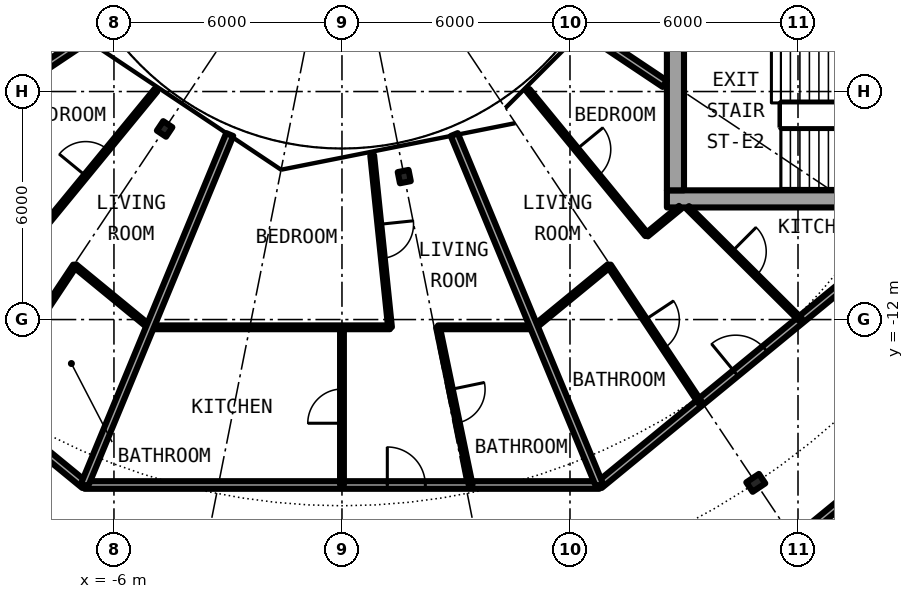
"""IFC4 building model, lengths in metres.
Left out: names, types, materials, properties, quantities, classifications, styles, units other than length and angle.
Written with IfcOpenShell. Run it as: python <this file> out.ifc"""

import sys

from ifc_helpers import new_model, si_unit, direction, frame, frame_2d, origin, origin_2d, place, context, subcontext, project, spatial, rectangle, i_section, extrude, element, fill, save


model = new_model("IFC4")
c1 = context("Model", 3, precision=1e-05, world=origin(), true_north=direction((0.0, 1.0)))
c2 = subcontext(c1, "Body", "Model", "MODEL_VIEW")
j1 = project(units=[si_unit("LENGTHUNIT", "METRE"), si_unit("PLANEANGLEUNIT", "RADIAN")], contexts=[c1])
p1 = place(None, origin())
s1 = spatial("IfcSite", under=j1, at=p1, CompositionType="ELEMENT")
p2 = place(p1, origin())
s2 = spatial("IfcBuilding", under=s1, at=p2, CompositionType="ELEMENT")
p3 = place(p2, frame((0.0, 0.0, 199.35)))
s3 = spatial("IfcBuildingStorey", under=s2, at=p3, CompositionType="ELEMENT", Elevation=199.35)
p4 = place(p3, frame((10.889, -16.297, 0.0), z_axis=(0.0, 0.0, 1.0), x_axis=(0.55557023302, -0.831469612303, 0.0)))
e1 = element("IfcColumn", 1, at=p4, inside=s3, PredefinedType="COLUMN", context=c2, shape_type="SweptSolid", body=[
    extrude(i_section(OverallWidth=0.3, OverallDepth=0.4, WebThickness=0.013, FlangeThickness=0.024, FilletRadius=0.027, at=origin_2d()), origin(), (0.0, 0.0, 1.0), 3.05),
])
for number, where, z_axis, x_axis in (
    (2, (-4.667, -6.984, 0.0), (0.0, 0.0, 1.0), (-0.556, -0.831, 0.0)),
    (3, (1.639, -8.239, 0.0), (0.0, 0.0, 1.0), (0.195, -0.981, 0.0)),
):
    element("IfcColumn", number, at=place(p3, frame(where, z_axis=z_axis, x_axis=x_axis)), inside=s3, PredefinedType="COLUMN", context=c2, shape_type="SweptSolid", body=[
        extrude(i_section(OverallWidth=0.3, OverallDepth=0.29, WebThickness=0.009, FlangeThickness=0.014, FilletRadius=0.027, at=origin_2d()), origin(), (0.0, 0.0, 1.0), 3.05),
    ])
p5 = place(p3, frame((8.55, -8.825, 0.0), z_axis=(0.0, 0.0, 1.0), x_axis=(1.0, 0.0, 0.0)))
e4 = element("IfcWall", 4, at=p5, inside=s3, PredefinedType="SHEAR", context=c2, shape_type="SweptSolid", body=[
    extrude(rectangle(XDim=13.5, YDim=0.45, at=frame_2d((6.75, 0.0))), origin(), (0.0, 0.0, 1.0), 3.05),
])
p6 = place(p5, frame((11.325, 0.0, 0.0)))
e5 = element("IfcOpeningElement", 5, at=p6, cuts=e4, PredefinedType="OPENING", context=c2, shape_type="SweptSolid", body=[
    extrude(rectangle(XDim=1.2, YDim=2.3, at=frame_2d((0.6, 1.15))), frame((0.0, 0.235, 0.0), z_axis=(0.0, -1.0, 0.0), x_axis=(1.0, 0.0, 0.0)), (0.0, 0.0, 1.0), 0.47),
])
p7 = place(p3, frame((8.775, -8.6, 0.0), z_axis=(0.0, 0.0, 1.0), x_axis=(0.0, 1.0, 0.0)))
e6 = element("IfcWall", 6, at=p7, inside=s3, PredefinedType="SHEAR", context=c2, shape_type="SweptSolid", body=[
    extrude(rectangle(XDim=17.2, YDim=0.45, at=frame_2d((8.6, 0.0))), origin(), (0.0, 0.0, 1.0), 3.05),
])
p8 = place(p7, frame((7.4, 0.0, 0.1)))
e7 = element("IfcOpeningElement", 7, at=p8, cuts=e6, PredefinedType="OPENING", context=c2, shape_type="SweptSolid", body=[
    extrude(rectangle(XDim=2.4, YDim=2.2, at=frame_2d((1.2, 1.1))), frame((0.0, 0.235, 0.0), z_axis=(0.0, -1.0, 0.0), x_axis=(1.0, 0.0, 0.0)), (0.0, 0.0, 1.0), 0.47),
])
p9 = place(p3, frame((8.534, -20.603, 0.0), z_axis=(0.0, 0.0, 1.0), x_axis=(0.772983503654, 0.634426121056, 0.0)))
e8 = element("IfcWall", 8, at=p9, inside=s3, PredefinedType="PARTITIONING", context=c2, shape_type="SweptSolid", body=[
    extrude(rectangle(XDim=12.947, YDim=0.2, at=frame_2d((6.474, 0.0))), origin(), (0.0, 0.0, 1.0), 2.7),
])
p10 = place(p9, frame((7.053, 0.0, 0.0)))
e9 = element("IfcOpeningElement", 9, at=p10, cuts=e8, PredefinedType="OPENING", context=c2, shape_type="SweptSolid", body=[
    extrude(rectangle(XDim=1.0, YDim=2.3, at=frame_2d((0.5, 1.15))), frame((0.0, 0.11, 0.0), z_axis=(0.0, -1.0, 0.0), x_axis=(1.0, 0.0, 0.0)), (0.0, 0.0, 1.0), 0.22),
])
p11 = place(p3, frame((-14.717, -9.834, 0.0), z_axis=(0.0, 0.0, 1.0), x_axis=(0.773034536097, -0.634363938131, 0.0)))
e10 = element("IfcWall", 10, at=p11, inside=s3, PredefinedType="PARTITIONING", context=c2, shape_type="SweptSolid", body=[
    extrude(rectangle(XDim=10.277, YDim=0.2, at=frame_2d((5.138, 0.0))), origin(), (0.0, 0.0, 1.0), 2.7),
])
p12 = place(p11, frame((4.638, 0.0, 0.0)))
e11 = element("IfcOpeningElement", 11, at=p12, cuts=e10, PredefinedType="OPENING", context=c2, shape_type="SweptSolid", body=[
    extrude(rectangle(XDim=1.0, YDim=2.3, at=frame_2d((0.5, 1.15))), frame((0.0, 0.11, 0.0), z_axis=(0.0, -1.0, 0.0), x_axis=(1.0, 0.0, 0.0)), (0.0, 0.0, 1.0), 0.22),
])
p13 = place(p3, frame((6.773, -16.353, 0.0), z_axis=(0.0, 0.0, 1.0), x_axis=(0.773034536097, 0.634363938131, 0.0)))
e12 = element("IfcWall", 12, at=p13, inside=s3, PredefinedType="PARTITIONING", context=c2, shape_type="SweptSolid", body=[
    extrude(rectangle(XDim=10.277, YDim=0.2, at=frame_2d((5.138, 0.0))), origin(), (0.0, 0.0, 1.0), 2.7),
])
p14 = place(p13, frame((4.638, 0.0, 0.0)))
e13 = element("IfcOpeningElement", 13, at=p14, cuts=e12, PredefinedType="OPENING", context=c2, shape_type="SweptSolid", body=[
    extrude(rectangle(XDim=1.0, YDim=2.3, at=frame_2d((0.5, 1.15))), frame((0.0, 0.11, 0.0), z_axis=(0.0, -1.0, 0.0), x_axis=(1.0, 0.0, 0.0)), (0.0, 0.0, 1.0), 0.22),
])
p15 = place(p3, frame((-6.773, -16.353, 0.0), z_axis=(0.0, 0.0, 1.0), x_axis=(1.0, 0.0, 0.0)))
e14 = element("IfcWall", 14, at=p15, inside=s3, PredefinedType="PARTITIONING", context=c2, shape_type="SweptSolid", body=[
    extrude(rectangle(XDim=13.546, YDim=0.2, at=frame_2d((6.773, 0.0))), origin(), (0.0, 0.0, 1.0), 2.7),
])
p16 = place(p15, frame((7.966, 0.0, 0.0)))
e15 = element("IfcOpeningElement", 15, at=p16, cuts=e14, PredefinedType="OPENING", context=c2, shape_type="SweptSolid", body=[
    extrude(rectangle(XDim=1.0, YDim=2.3, at=frame_2d((0.5, 1.15))), frame((0.0, 0.11, 0.0), z_axis=(0.0, -1.0, 0.0), x_axis=(1.0, 0.0, 0.0)), (0.0, 0.0, 1.0), 0.22),
])
for number, where, z_axis, x_axis in (
    (16, (-7.031, -10.582, 0.0), (0.0, 0.0, 1.0), (0.773, -0.634, 0.0)),
    (17, (5.055, -12.204, 0.0), (0.0, 0.0, 1.0), (0.773, 0.634, 0.0)),
):
    element("IfcWall", number, at=place(p3, frame(where, z_axis=z_axis, x_axis=x_axis)), inside=s3, PredefinedType="PARTITIONING", context=c2, shape_type="SweptSolid", body=[
        extrude(rectangle(XDim=2.557, YDim=0.1, at=frame_2d((1.278, 0.0))), origin(), (0.0, 0.0, 1.0), 2.7),
    ])
p17 = place(p3, frame((8.017, -9.773, 0.0), z_axis=(0.0, 0.0, 1.0), x_axis=(0.772786083133, 0.634666581534, 0.0)))
e18 = element("IfcWall", 18, at=p17, inside=s3, PredefinedType="PARTITIONING", context=c2, shape_type="SweptSolid", body=[
    extrude(rectangle(XDim=1.144, YDim=0.1, at=frame_2d((0.572, 0.0))), origin(), (0.0, 0.0, 1.0), 2.7),
])
p18 = place(p3, frame((-5.055, -12.204, 0.0), z_axis=(0.0, 0.0, 1.0), x_axis=(1.0, 0.0, 0.0)))
e19 = element("IfcWall", 19, at=p18, inside=s3, PredefinedType="PARTITIONING", context=c2, shape_type="SweptSolid", body=[
    extrude(rectangle(XDim=6.319, YDim=0.1, at=frame_2d((3.159, 0.0))), origin(), (0.0, 0.0, 1.0), 2.7),
])
p19 = place(p3, frame((2.527, -12.204, 0.0), z_axis=(0.0, 0.0, 1.0), x_axis=(1.0, 0.0, 0.0)))
e20 = element("IfcWall", 20, at=p19, inside=s3, PredefinedType="PARTITIONING", context=c2, shape_type="SweptSolid", body=[
    extrude(rectangle(XDim=2.528, YDim=0.1, at=frame_2d((1.264, 0.0))), origin(), (0.0, 0.0, 1.0), 2.7),
])
for number, where, z_axis, x_axis in (
    (21, (-6.513, -4.472, 0.0), (0.0, 0.0, 1.0), (-0.831, -0.556, 0.0)),
    (22, (6.513, -4.472, 0.0), (0.0, 0.0, 1.0), (0.831, -0.556, 0.0)),
):
    element("IfcWall", number, at=place(p3, frame(where, z_axis=z_axis, x_axis=x_axis)), inside=s3, PredefinedType="PARTITIONING", context=c2, shape_type="SweptSolid", body=[
        extrude(rectangle(XDim=2.383, YDim=0.2, at=frame_2d((1.191, 0.0))), origin(), (0.0, 0.0, 1.0), 2.7),
    ])
p20 = place(p3, frame((-9.421, -14.18, 0.0), z_axis=(0.0, 0.0, 1.0), x_axis=(0.553303732327, 0.832979579457, 0.0)))
e23 = element("IfcWall", 23, at=p20, inside=s3, PredefinedType="PARTITIONING", context=c2, shape_type="SweptSolid", body=[
    extrude(rectangle(XDim=4.319, YDim=0.1, at=frame_2d((2.16, 0.0))), origin(), (0.0, 0.0, 1.0), 2.7),
])
p21 = place(p20, frame((1.71, 0.0, 0.0)))
e24 = element("IfcOpeningElement", 24, at=p21, cuts=e23, PredefinedType="OPENING", context=c2, shape_type="SweptSolid", body=[
    extrude(rectangle(XDim=0.9, YDim=2.3, at=frame_2d((0.45, 1.15))), frame((0.0, 0.06, 0.0), z_axis=(0.0, -1.0, 0.0), x_axis=(1.0, 0.0, 0.0)), (0.0, 0.0, 1.0), 0.12),
])
p22 = place(p3, frame((-8.019, -9.771, 0.0), z_axis=(0.0, 0.0, 1.0), x_axis=(0.634401778971, 0.773003481776, 0.0)))
e25 = element("IfcWall", 25, at=p22, inside=s3, PredefinedType="PARTITIONING", context=c2, shape_type="SweptSolid", body=[
    extrude(rectangle(XDim=4.92, YDim=0.1, at=frame_2d((2.46, 0.0))), origin(), (0.0, 0.0, 1.0), 2.7),
])
p23 = place(p22, frame((2.01, 0.0, 0.0)))
e26 = element("IfcOpeningElement", 26, at=p23, cuts=e25, PredefinedType="OPENING", context=c2, shape_type="SweptSolid", body=[
    extrude(rectangle(XDim=0.9, YDim=2.3, at=frame_2d((0.45, 1.15))), frame((0.0, 0.06, 0.0), z_axis=(0.0, -1.0, 0.0), x_axis=(1.0, 0.0, 0.0)), (0.0, 0.0, 1.0), 0.12),
])
p24 = place(p3, frame((-6.774, -16.353, 0.0), z_axis=(0.0, 0.0, 1.0), x_axis=(0.382716169203, 0.92386597179, 0.0)))
e27 = element("IfcWall", 27, at=p24, inside=s3, PredefinedType="PARTITIONING", context=c2, shape_type="SweptSolid", body=[
    extrude(rectangle(XDim=9.981, YDim=0.2, at=frame_2d((4.99, 0.0))), origin(), (0.0, 0.0, 1.0), 2.7),
])
p25 = place(p3, frame((0.0, -16.353, 0.0), z_axis=(0.0, 0.0, 1.0), x_axis=(0.0, 1.0, 0.0)))
e28 = element("IfcWall", 28, at=p25, inside=s3, PredefinedType="PARTITIONING", context=c2, shape_type="SweptSolid", body=[
    extrude(rectangle(XDim=4.149, YDim=0.1, at=frame_2d((2.074, 0.0))), origin(), (0.0, 0.0, 1.0), 2.7),
])
p26 = place(p25, frame((1.625, 0.0, 0.0)))
e29 = element("IfcOpeningElement", 29, at=p26, cuts=e28, PredefinedType="OPENING", context=c2, shape_type="SweptSolid", body=[
    extrude(rectangle(XDim=0.9, YDim=2.3, at=frame_2d((0.45, 1.15))), frame((0.0, 0.06, 0.0), z_axis=(0.0, -1.0, 0.0), x_axis=(1.0, 0.0, 0.0)), (0.0, 0.0, 1.0), 0.12),
])
p27 = place(p3, frame((0.795, -7.679, 0.0), z_axis=(0.0, 0.0, 1.0), x_axis=(0.103089563582, -0.994672077561, 0.0)))
e30 = element("IfcWall", 30, at=p27, inside=s3, PredefinedType="PARTITIONING", context=c2, shape_type="SweptSolid", body=[
    extrude(rectangle(XDim=4.549, YDim=0.1, at=frame_2d((2.275, 0.0))), origin(), (0.0, 0.0, 1.0), 2.7),
])
p28 = place(p27, frame((1.825, 0.0, 0.0)))
e31 = element("IfcOpeningElement", 31, at=p28, cuts=e30, PredefinedType="OPENING", context=c2, shape_type="SweptSolid", body=[
    extrude(rectangle(XDim=0.9, YDim=2.3, at=frame_2d((0.45, 1.15))), frame((0.0, 0.06, 0.0), z_axis=(0.0, -1.0, 0.0), x_axis=(1.0, 0.0, 0.0)), (0.0, 0.0, 1.0), 0.12),
])
p29 = place(p3, frame((2.527, -12.204, 0.0), z_axis=(0.0, 0.0, 1.0), x_axis=(0.202937120105, -0.979191771454, 0.0)))
e32 = element("IfcWall", 32, at=p29, inside=s3, PredefinedType="PARTITIONING", context=c2, shape_type="SweptSolid", body=[
    extrude(rectangle(XDim=4.237, YDim=0.1, at=frame_2d((2.119, 0.0))), origin(), (0.0, 0.0, 1.0), 2.7),
])
p30 = place(p29, frame((1.669, 0.0, 0.0)))
e33 = element("IfcOpeningElement", 33, at=p30, cuts=e32, PredefinedType="OPENING", context=c2, shape_type="SweptSolid", body=[
    extrude(rectangle(XDim=0.9, YDim=2.3, at=frame_2d((0.45, 1.15))), frame((0.0, 0.06, 0.0), z_axis=(0.0, -1.0, 0.0), x_axis=(1.0, 0.0, 0.0)), (0.0, 0.0, 1.0), 0.12),
])
p31 = place(p3, frame((2.954, -7.132, 0.0), z_axis=(0.0, 0.0, 1.0), x_axis=(0.382716169203, -0.92386597179, 0.0)))
e34 = element("IfcWall", 34, at=p31, inside=s3, PredefinedType="PARTITIONING", context=c2, shape_type="SweptSolid", body=[
    extrude(rectangle(XDim=9.981, YDim=0.2, at=frame_2d((4.99, 0.0))), origin(), (0.0, 0.0, 1.0), 2.7),
])
p32 = place(p3, frame((4.898, -5.968, 0.0), z_axis=(0.0, 0.0, 1.0), x_axis=(0.634401778971, -0.773003481776, 0.0)))
e35 = element("IfcWall", 35, at=p32, inside=s3, PredefinedType="PARTITIONING", context=c2, shape_type="SweptSolid", body=[
    extrude(rectangle(XDim=4.92, YDim=0.1, at=frame_2d((2.46, 0.0))), origin(), (0.0, 0.0, 1.0), 2.7),
])
p33 = place(p32, frame((2.01, 0.0, 0.0)))
e36 = element("IfcOpeningElement", 36, at=p33, cuts=e35, PredefinedType="OPENING", context=c2, shape_type="SweptSolid", body=[
    extrude(rectangle(XDim=0.9, YDim=2.3, at=frame_2d((0.45, 1.15))), frame((0.0, 0.06, 0.0), z_axis=(0.0, -1.0, 0.0), x_axis=(1.0, 0.0, 0.0)), (0.0, 0.0, 1.0), 0.12),
])
p34 = place(p3, frame((7.031, -10.582, 0.0), z_axis=(0.0, 0.0, 1.0), x_axis=(0.553303732327, -0.832979579457, 0.0)))
e37 = element("IfcWall", 37, at=p34, inside=s3, PredefinedType="PARTITIONING", context=c2, shape_type="SweptSolid", body=[
    extrude(rectangle(XDim=4.319, YDim=0.1, at=frame_2d((2.16, 0.0))), origin(), (0.0, 0.0, 1.0), 2.7),
])
p35 = place(p34, frame((1.71, 0.0, 0.0)))
e38 = element("IfcOpeningElement", 38, at=p35, cuts=e37, PredefinedType="OPENING", context=c2, shape_type="SweptSolid", body=[
    extrude(rectangle(XDim=0.9, YDim=2.3, at=frame_2d((0.45, 1.15))), frame((0.0, 0.06, 0.0), z_axis=(0.0, -1.0, 0.0), x_axis=(1.0, 0.0, 0.0)), (0.0, 0.0, 1.0), 0.12),
])
p36 = place(p3, frame((9.097, -9.05, 0.0), z_axis=(0.0, 0.0, 1.0), x_axis=(0.708909651863, -0.705299302067, 0.0)))
e39 = element("IfcWall", 39, at=p36, inside=s3, PredefinedType="PARTITIONING", context=c2, shape_type="SweptSolid", body=[
    extrude(rectangle(XDim=4.193, YDim=0.1, at=frame_2d((2.096, 0.0))), origin(), (0.0, 0.0, 1.0), 2.7),
])
p37 = place(p36, frame((1.646, 0.0, 0.0)))
e40 = element("IfcOpeningElement", 40, at=p37, cuts=e39, PredefinedType="OPENING", context=c2, shape_type="SweptSolid", body=[
    extrude(rectangle(XDim=0.9, YDim=2.3, at=frame_2d((0.45, 1.15))), frame((0.0, 0.06, 0.0), z_axis=(0.0, -1.0, 0.0), x_axis=(1.0, 0.0, 0.0)), (0.0, 0.0, 1.0), 0.12),
])
p38 = place(p23, origin())
e41 = element("IfcDoor", 41, at=p38, inside=s3, OperationType="SINGLE_SWING_LEFT", PredefinedType="DOOR", context=c2, shape_type="SweptSolid", body=[
    extrude(rectangle(XDim=0.9, YDim=2.3, at=frame_2d((0.45, 1.15))), frame((0.0, 0.025, 0.0), z_axis=(0.0, -1.0, 0.0), x_axis=(1.0, 0.0, 0.0)), (0.0, 0.0, 1.0), 0.05),
])
fill(e26, e41)
p39 = place(p16, origin())
e42 = element("IfcDoor", 42, at=p39, inside=s3, OperationType="SINGLE_SWING_RIGHT", PredefinedType="DOOR", context=c2, shape_type="SweptSolid", body=[
    extrude(rectangle(XDim=1.0, YDim=2.3, at=frame_2d((0.5, 1.15))), frame((0.0, 0.025, 0.0), z_axis=(0.0, -1.0, 0.0), x_axis=(1.0, 0.0, 0.0)), (0.0, 0.0, 1.0), 0.05),
])
fill(e15, e42)
p40 = place(p30, origin())
e43 = element("IfcDoor", 43, at=p40, inside=s3, OperationType="SINGLE_SWING_RIGHT", PredefinedType="DOOR", context=c2, shape_type="SweptSolid", body=[
    extrude(rectangle(XDim=0.9, YDim=2.3, at=frame_2d((0.45, 1.15))), frame((0.0, 0.025, 0.0), z_axis=(0.0, -1.0, 0.0), x_axis=(1.0, 0.0, 0.0)), (0.0, 0.0, 1.0), 0.05),
])
fill(e33, e43)
p41 = place(p26, origin())
e44 = element("IfcDoor", 44, at=p41, inside=s3, OperationType="SINGLE_SWING_RIGHT", PredefinedType="DOOR", context=c2, shape_type="SweptSolid", body=[
    extrude(rectangle(XDim=0.9, YDim=2.3, at=frame_2d((0.45, 1.15))), frame((0.0, 0.025, 0.0), z_axis=(0.0, -1.0, 0.0), x_axis=(1.0, 0.0, 0.0)), (0.0, 0.0, 1.0), 0.05),
])
fill(e29, e44)
p42 = place(p28, origin())
e45 = element("IfcDoor", 45, at=p42, inside=s3, OperationType="SINGLE_SWING_RIGHT", PredefinedType="DOOR", context=c2, shape_type="SweptSolid", body=[
    extrude(rectangle(XDim=0.9, YDim=2.3, at=frame_2d((0.45, 1.15))), frame((0.0, 0.025, 0.0), z_axis=(0.0, -1.0, 0.0), x_axis=(1.0, 0.0, 0.0)), (0.0, 0.0, 1.0), 0.05),
])
fill(e31, e45)
p43 = place(p14, origin())
e46 = element("IfcDoor", 46, at=p43, inside=s3, OperationType="SINGLE_SWING_RIGHT", PredefinedType="DOOR", context=c2, shape_type="SweptSolid", body=[
    extrude(rectangle(XDim=1.0, YDim=2.3, at=frame_2d((0.5, 1.15))), frame((0.0, 0.025, 0.0), z_axis=(0.0, -1.0, 0.0), x_axis=(1.0, 0.0, 0.0)), (0.0, 0.0, 1.0), 0.05),
])
fill(e13, e46)
p44 = place(p35, origin())
e47 = element("IfcDoor", 47, at=p44, inside=s3, OperationType="SINGLE_SWING_RIGHT", PredefinedType="DOOR", context=c2, shape_type="SweptSolid", body=[
    extrude(rectangle(XDim=0.9, YDim=2.3, at=frame_2d((0.45, 1.15))), frame((0.0, 0.025, 0.0), z_axis=(0.0, -1.0, 0.0), x_axis=(1.0, 0.0, 0.0)), (0.0, 0.0, 1.0), 0.05),
])
fill(e38, e47)
p45 = place(p37, origin())
e48 = element("IfcDoor", 48, at=p45, inside=s3, OperationType="SINGLE_SWING_RIGHT", PredefinedType="DOOR", context=c2, shape_type="SweptSolid", body=[
    extrude(rectangle(XDim=0.9, YDim=2.3, at=frame_2d((0.45, 1.15))), frame((0.0, 0.025, 0.0), z_axis=(0.0, -1.0, 0.0), x_axis=(1.0, 0.0, 0.0)), (0.0, 0.0, 1.0), 0.05),
])
fill(e40, e48)
p46 = place(p33, origin())
e49 = element("IfcDoor", 49, at=p46, inside=s3, OperationType="SINGLE_SWING_RIGHT", PredefinedType="DOOR", context=c2, shape_type="SweptSolid", body=[
    extrude(rectangle(XDim=0.9, YDim=2.3, at=frame_2d((0.45, 1.15))), frame((0.0, 0.025, 0.0), z_axis=(0.0, -1.0, 0.0), x_axis=(1.0, 0.0, 0.0)), (0.0, 0.0, 1.0), 0.05),
])
fill(e36, e49)
save(model, sys.argv[1])
